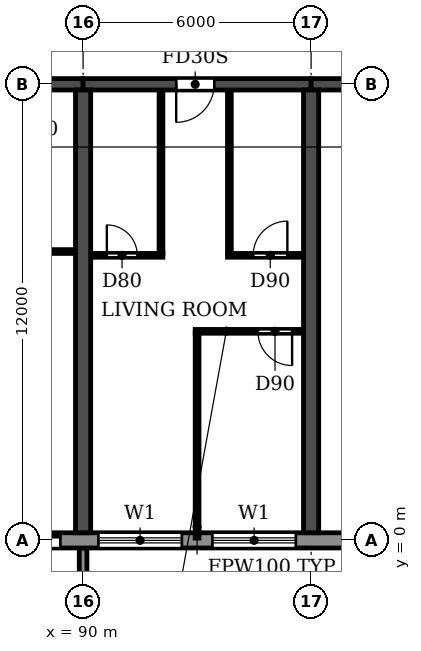
"""IFC4 building model, lengths in metres.
Left out: names, types, materials, properties, quantities, classifications, styles, units other than length and angle.
Written with IfcOpenShell. Run it as: python <this file> out.ifc"""

import sys

from ifc_helpers import new_model, si_unit, direction, frame, frame_2d, origin, place, context, subcontext, project, spatial, polyline, rectangle, outline, extrude, source, transform, mapped, element, fill, save


model = new_model("IFC4")
c1 = context("Model", 3, precision=1e-05, world=origin(), true_north=direction((0.0, 1.0)))
c2 = subcontext(c1, "Body", "Model", "MODEL_VIEW")
j1 = project(units=[si_unit("LENGTHUNIT", "METRE"), si_unit("PLANEANGLEUNIT", "RADIAN")], contexts=[c1])
p1 = place(None, origin())
s1 = spatial("IfcSite", under=j1, at=p1, CompositionType="ELEMENT")
p2 = place(p1, origin())
s2 = spatial("IfcBuilding", under=s1, at=p2, CompositionType="ELEMENT")
p3 = place(p2, frame((0.0, 0.0, 43.2)))
s3 = spatial("IfcBuildingStorey", under=s2, at=p3, CompositionType="ELEMENT", Elevation=43.2)
for number, where, z_axis, x_axis in (
    (1, (90.0, 0.2, 0.0), (0.0, 0.0, 1.0), (0.0, 1.0, 0.0)),
    (2, (96.0, 0.2, 0.0), (0.0, 0.0, 1.0), (0.0, 1.0, 0.0)),
):
    element("IfcWall", number, at=place(p3, frame(where, z_axis=z_axis, x_axis=x_axis)), inside=s3, PredefinedType="SHEAR", context=c2, shape_type="SweptSolid", body=[
        extrude(rectangle(XDim=11.65, YDim=0.4, at=frame_2d((5.825, 0.0))), origin(), (0.0, 0.0, 1.0), 3.05),
    ])
p4 = place(p3, frame((84.0, 12.0, 0.0), z_axis=(0.0, 0.0, 1.0), x_axis=(1.0, 0.0, 0.0)))
e3 = element("IfcWall", 3, at=p4, inside=s3, PredefinedType="SHEAR", context=c2, shape_type="SweptSolid", body=[
    extrude(rectangle(XDim=6.0, YDim=0.3, at=frame_2d((3.0, 0.0))), origin(), (0.0, 0.0, 1.0), 2.45),
])
p5 = place(p4, frame((2.45, 0.0, 0.0)))
e4 = element("IfcOpeningElement", 4, at=p5, cuts=e3, PredefinedType="OPENING", context=c2, shape_type="SweptSolid", body=[
    extrude(rectangle(XDim=1.0, YDim=2.1, at=frame_2d((0.5, 1.05))), frame((0.0, 0.16, 0.0), z_axis=(0.0, -1.0, 0.0), x_axis=(1.0, 0.0, 0.0)), (0.0, 0.0, 1.0), 0.32),
])
p6 = place(p3, frame((90.0, 12.0, 0.0), z_axis=(0.0, 0.0, 1.0), x_axis=(1.0, 0.0, 0.0)))
e5 = element("IfcWall", 5, at=p6, inside=s3, PredefinedType="SHEAR", context=c2, shape_type="SweptSolid", body=[
    extrude(rectangle(XDim=6.0, YDim=0.3, at=frame_2d((3.0, 0.0))), origin(), (0.0, 0.0, 1.0), 2.45),
])
p7 = place(p6, frame((2.45, 0.0, 0.0)))
e6 = element("IfcOpeningElement", 6, at=p7, cuts=e5, PredefinedType="OPENING", context=c2, shape_type="SweptSolid", body=[
    extrude(rectangle(XDim=1.0, YDim=2.1, at=frame_2d((0.5, 1.05))), frame((0.0, 0.16, 0.0), z_axis=(0.0, -1.0, 0.0), x_axis=(1.0, 0.0, 0.0)), (0.0, 0.0, 1.0), 0.32),
])
p8 = place(p3, frame((96.0, 12.0, 0.0), z_axis=(0.0, 0.0, 1.0), x_axis=(1.0, 0.0, 0.0)))
e7 = element("IfcWall", 7, at=p8, inside=s3, PredefinedType="SHEAR", context=c2, shape_type="SweptSolid", body=[
    extrude(rectangle(XDim=5.8, YDim=0.3, at=frame_2d((2.9, 0.0))), origin(), (0.0, 0.0, 1.0), 2.45),
])
p9 = place(p8, frame((2.5, 0.0, 0.0)))
e8 = element("IfcOpeningElement", 8, at=p9, cuts=e7, PredefinedType="OPENING", context=c2, shape_type="SweptSolid", body=[
    extrude(rectangle(XDim=1.0, YDim=2.1, at=frame_2d((0.5, 1.05))), frame((0.0, 0.16, 0.0), z_axis=(0.0, -1.0, 0.0), x_axis=(1.0, 0.0, 0.0)), (0.0, 0.0, 1.0), 0.32),
])
p10 = place(p3, frame((4.683, 0.0, 0.0), z_axis=(0.0, 0.0, 1.0), x_axis=(1.0, 0.0, 0.0)))
e9 = element("IfcWall", 9, at=p10, inside=s3, PredefinedType="STANDARD", context=c2, shape_type="SweptSolid", body=[
    extrude(rectangle(XDim=92.634, YDim=0.4, at=frame_2d((46.317, 0.0))), origin(), (0.0, 0.0, 1.0), 3.05),
])
p11 = place(p10, frame((1.717, 0.0, 0.9)))
e10 = element("IfcOpeningElement", 10, at=p11, cuts=e9, PredefinedType="OPENING", context=c2, shape_type="SweptSolid", body=[
    extrude(rectangle(XDim=2.2, YDim=1.5, at=frame_2d((1.1, 0.75))), frame((0.0, 0.21, 0.0), z_axis=(0.0, -1.0, 0.0), x_axis=(1.0, 0.0, 0.0)), (0.0, 0.0, 1.0), 0.42),
])
p12 = place(p10, frame((4.717, 0.0, 0.9)))
e11 = element("IfcOpeningElement", 11, at=p12, cuts=e9, PredefinedType="OPENING", context=c2, shape_type="SweptSolid", body=[
    extrude(rectangle(XDim=2.2, YDim=1.5, at=frame_2d((1.1, 0.75))), frame((0.0, 0.21, 0.0), z_axis=(0.0, -1.0, 0.0), x_axis=(1.0, 0.0, 0.0)), (0.0, 0.0, 1.0), 0.42),
])
p13 = place(p10, frame((7.717, 0.0, 0.9)))
e12 = element("IfcOpeningElement", 12, at=p13, cuts=e9, PredefinedType="OPENING", context=c2, shape_type="SweptSolid", body=[
    extrude(rectangle(XDim=2.2, YDim=1.5, at=frame_2d((1.1, 0.75))), frame((0.0, 0.21, 0.0), z_axis=(0.0, -1.0, 0.0), x_axis=(1.0, 0.0, 0.0)), (0.0, 0.0, 1.0), 0.42),
])
p14 = place(p10, frame((10.917, 0.0, 0.0)))
e13 = element("IfcOpeningElement", 13, at=p14, cuts=e9, PredefinedType="OPENING", context=c2, shape_type="SweptSolid", body=[
    extrude(rectangle(XDim=1.8, YDim=2.4, at=frame_2d((0.9, 1.2))), frame((0.0, 0.21, 0.0), z_axis=(0.0, -1.0, 0.0), x_axis=(1.0, 0.0, 0.0)), (0.0, 0.0, 1.0), 0.42),
])
p15 = place(p10, frame((13.717, 0.0, 0.9)))
e14 = element("IfcOpeningElement", 14, at=p15, cuts=e9, PredefinedType="OPENING", context=c2, shape_type="SweptSolid", body=[
    extrude(rectangle(XDim=2.2, YDim=1.5, at=frame_2d((1.1, 0.75))), frame((0.0, 0.21, 0.0), z_axis=(0.0, -1.0, 0.0), x_axis=(1.0, 0.0, 0.0)), (0.0, 0.0, 1.0), 0.42),
])
p16 = place(p10, frame((16.717, 0.0, 0.9)))
e15 = element("IfcOpeningElement", 15, at=p16, cuts=e9, PredefinedType="OPENING", context=c2, shape_type="SweptSolid", body=[
    extrude(rectangle(XDim=2.2, YDim=1.5, at=frame_2d((1.1, 0.75))), frame((0.0, 0.21, 0.0), z_axis=(0.0, -1.0, 0.0), x_axis=(1.0, 0.0, 0.0)), (0.0, 0.0, 1.0), 0.42),
])
p17 = place(p10, frame((19.917, 0.0, 0.0)))
e16 = element("IfcOpeningElement", 16, at=p17, cuts=e9, PredefinedType="OPENING", context=c2, shape_type="SweptSolid", body=[
    extrude(rectangle(XDim=1.8, YDim=2.4, at=frame_2d((0.9, 1.2))), frame((0.0, 0.21, 0.0), z_axis=(0.0, -1.0, 0.0), x_axis=(1.0, 0.0, 0.0)), (0.0, 0.0, 1.0), 0.42),
])
p18 = place(p10, frame((22.717, 0.0, 0.9)))
e17 = element("IfcOpeningElement", 17, at=p18, cuts=e9, PredefinedType="OPENING", context=c2, shape_type="SweptSolid", body=[
    extrude(rectangle(XDim=2.2, YDim=1.5, at=frame_2d((1.1, 0.75))), frame((0.0, 0.21, 0.0), z_axis=(0.0, -1.0, 0.0), x_axis=(1.0, 0.0, 0.0)), (0.0, 0.0, 1.0), 0.42),
])
p19 = place(p10, frame((25.717, 0.0, 0.9)))
e18 = element("IfcOpeningElement", 18, at=p19, cuts=e9, PredefinedType="OPENING", context=c2, shape_type="SweptSolid", body=[
    extrude(rectangle(XDim=2.2, YDim=1.5, at=frame_2d((1.1, 0.75))), frame((0.0, 0.21, 0.0), z_axis=(0.0, -1.0, 0.0), x_axis=(1.0, 0.0, 0.0)), (0.0, 0.0, 1.0), 0.42),
])
p20 = place(p10, frame((28.717, 0.0, 0.9)))
e19 = element("IfcOpeningElement", 19, at=p20, cuts=e9, PredefinedType="OPENING", context=c2, shape_type="SweptSolid", body=[
    extrude(rectangle(XDim=2.2, YDim=1.5, at=frame_2d((1.1, 0.75))), frame((0.0, 0.21, 0.0), z_axis=(0.0, -1.0, 0.0), x_axis=(1.0, 0.0, 0.0)), (0.0, 0.0, 1.0), 0.42),
])
p21 = place(p10, frame((31.717, 0.0, 0.9)))
e20 = element("IfcOpeningElement", 20, at=p21, cuts=e9, PredefinedType="OPENING", context=c2, shape_type="SweptSolid", body=[
    extrude(rectangle(XDim=2.2, YDim=1.5, at=frame_2d((1.1, 0.75))), frame((0.0, 0.21, 0.0), z_axis=(0.0, -1.0, 0.0), x_axis=(1.0, 0.0, 0.0)), (0.0, 0.0, 1.0), 0.42),
])
p22 = place(p10, frame((34.917, 0.0, 0.0)))
e21 = element("IfcOpeningElement", 21, at=p22, cuts=e9, PredefinedType="OPENING", context=c2, shape_type="SweptSolid", body=[
    extrude(rectangle(XDim=1.8, YDim=2.4, at=frame_2d((0.9, 1.2))), frame((0.0, 0.21, 0.0), z_axis=(0.0, -1.0, 0.0), x_axis=(1.0, 0.0, 0.0)), (0.0, 0.0, 1.0), 0.42),
])
p23 = place(p10, frame((37.717, 0.0, 0.9)))
e22 = element("IfcOpeningElement", 22, at=p23, cuts=e9, PredefinedType="OPENING", context=c2, shape_type="SweptSolid", body=[
    extrude(rectangle(XDim=2.2, YDim=1.5, at=frame_2d((1.1, 0.75))), frame((0.0, 0.21, 0.0), z_axis=(0.0, -1.0, 0.0), x_axis=(1.0, 0.0, 0.0)), (0.0, 0.0, 1.0), 0.42),
])
p24 = place(p10, frame((40.717, 0.0, 0.9)))
e23 = element("IfcOpeningElement", 23, at=p24, cuts=e9, PredefinedType="OPENING", context=c2, shape_type="SweptSolid", body=[
    extrude(rectangle(XDim=2.2, YDim=1.5, at=frame_2d((1.1, 0.75))), frame((0.0, 0.21, 0.0), z_axis=(0.0, -1.0, 0.0), x_axis=(1.0, 0.0, 0.0)), (0.0, 0.0, 1.0), 0.42),
])
p25 = place(p10, frame((43.717, 0.0, 0.9)))
e24 = element("IfcOpeningElement", 24, at=p25, cuts=e9, PredefinedType="OPENING", context=c2, shape_type="SweptSolid", body=[
    extrude(rectangle(XDim=2.2, YDim=1.5, at=frame_2d((1.1, 0.75))), frame((0.0, 0.21, 0.0), z_axis=(0.0, -1.0, 0.0), x_axis=(1.0, 0.0, 0.0)), (0.0, 0.0, 1.0), 0.42),
])
p26 = place(p10, frame((46.917, 0.0, 0.0)))
e25 = element("IfcOpeningElement", 25, at=p26, cuts=e9, PredefinedType="OPENING", context=c2, shape_type="SweptSolid", body=[
    extrude(rectangle(XDim=1.8, YDim=2.4, at=frame_2d((0.9, 1.2))), frame((0.0, 0.21, 0.0), z_axis=(0.0, -1.0, 0.0), x_axis=(1.0, 0.0, 0.0)), (0.0, 0.0, 1.0), 0.42),
])
p27 = place(p10, frame((49.717, 0.0, 0.9)))
e26 = element("IfcOpeningElement", 26, at=p27, cuts=e9, PredefinedType="OPENING", context=c2, shape_type="SweptSolid", body=[
    extrude(rectangle(XDim=2.2, YDim=1.5, at=frame_2d((1.1, 0.75))), frame((0.0, 0.21, 0.0), z_axis=(0.0, -1.0, 0.0), x_axis=(1.0, 0.0, 0.0)), (0.0, 0.0, 1.0), 0.42),
])
p28 = place(p10, frame((52.717, 0.0, 0.9)))
e27 = element("IfcOpeningElement", 27, at=p28, cuts=e9, PredefinedType="OPENING", context=c2, shape_type="SweptSolid", body=[
    extrude(rectangle(XDim=2.2, YDim=1.5, at=frame_2d((1.1, 0.75))), frame((0.0, 0.21, 0.0), z_axis=(0.0, -1.0, 0.0), x_axis=(1.0, 0.0, 0.0)), (0.0, 0.0, 1.0), 0.42),
])
p29 = place(p10, frame((55.717, 0.0, 0.9)))
e28 = element("IfcOpeningElement", 28, at=p29, cuts=e9, PredefinedType="OPENING", context=c2, shape_type="SweptSolid", body=[
    extrude(rectangle(XDim=2.2, YDim=1.5, at=frame_2d((1.1, 0.75))), frame((0.0, 0.21, 0.0), z_axis=(0.0, -1.0, 0.0), x_axis=(1.0, 0.0, 0.0)), (0.0, 0.0, 1.0), 0.42),
])
p30 = place(p10, frame((58.917, 0.0, 0.0)))
e29 = element("IfcOpeningElement", 29, at=p30, cuts=e9, PredefinedType="OPENING", context=c2, shape_type="SweptSolid", body=[
    extrude(rectangle(XDim=1.8, YDim=2.4, at=frame_2d((0.9, 1.2))), frame((0.0, 0.21, 0.0), z_axis=(0.0, -1.0, 0.0), x_axis=(1.0, 0.0, 0.0)), (0.0, 0.0, 1.0), 0.42),
])
p31 = place(p10, frame((61.717, 0.0, 0.9)))
e30 = element("IfcOpeningElement", 30, at=p31, cuts=e9, PredefinedType="OPENING", context=c2, shape_type="SweptSolid", body=[
    extrude(rectangle(XDim=2.2, YDim=1.5, at=frame_2d((1.1, 0.75))), frame((0.0, 0.21, 0.0), z_axis=(0.0, -1.0, 0.0), x_axis=(1.0, 0.0, 0.0)), (0.0, 0.0, 1.0), 0.42),
])
p32 = place(p10, frame((64.717, 0.0, 0.9)))
e31 = element("IfcOpeningElement", 31, at=p32, cuts=e9, PredefinedType="OPENING", context=c2, shape_type="SweptSolid", body=[
    extrude(rectangle(XDim=2.2, YDim=1.5, at=frame_2d((1.1, 0.75))), frame((0.0, 0.21, 0.0), z_axis=(0.0, -1.0, 0.0), x_axis=(1.0, 0.0, 0.0)), (0.0, 0.0, 1.0), 0.42),
])
p33 = place(p10, frame((67.717, 0.0, 0.9)))
e32 = element("IfcOpeningElement", 32, at=p33, cuts=e9, PredefinedType="OPENING", context=c2, shape_type="SweptSolid", body=[
    extrude(rectangle(XDim=2.2, YDim=1.5, at=frame_2d((1.1, 0.75))), frame((0.0, 0.21, 0.0), z_axis=(0.0, -1.0, 0.0), x_axis=(1.0, 0.0, 0.0)), (0.0, 0.0, 1.0), 0.42),
])
p34 = place(p10, frame((70.917, 0.0, 0.0)))
e33 = element("IfcOpeningElement", 33, at=p34, cuts=e9, PredefinedType="OPENING", context=c2, shape_type="SweptSolid", body=[
    extrude(rectangle(XDim=1.8, YDim=2.4, at=frame_2d((0.9, 1.2))), frame((0.0, 0.21, 0.0), z_axis=(0.0, -1.0, 0.0), x_axis=(1.0, 0.0, 0.0)), (0.0, 0.0, 1.0), 0.42),
])
p35 = place(p10, frame((73.717, 0.0, 0.9)))
e34 = element("IfcOpeningElement", 34, at=p35, cuts=e9, PredefinedType="OPENING", context=c2, shape_type="SweptSolid", body=[
    extrude(rectangle(XDim=2.2, YDim=1.5, at=frame_2d((1.1, 0.75))), frame((0.0, 0.21, 0.0), z_axis=(0.0, -1.0, 0.0), x_axis=(1.0, 0.0, 0.0)), (0.0, 0.0, 1.0), 0.42),
])
p36 = place(p10, frame((76.717, 0.0, 0.9)))
e35 = element("IfcOpeningElement", 35, at=p36, cuts=e9, PredefinedType="OPENING", context=c2, shape_type="SweptSolid", body=[
    extrude(rectangle(XDim=2.2, YDim=1.5, at=frame_2d((1.1, 0.75))), frame((0.0, 0.21, 0.0), z_axis=(0.0, -1.0, 0.0), x_axis=(1.0, 0.0, 0.0)), (0.0, 0.0, 1.0), 0.42),
])
p37 = place(p10, frame((79.717, 0.0, 0.9)))
e36 = element("IfcOpeningElement", 36, at=p37, cuts=e9, PredefinedType="OPENING", context=c2, shape_type="SweptSolid", body=[
    extrude(rectangle(XDim=2.2, YDim=1.5, at=frame_2d((1.1, 0.75))), frame((0.0, 0.21, 0.0), z_axis=(0.0, -1.0, 0.0), x_axis=(1.0, 0.0, 0.0)), (0.0, 0.0, 1.0), 0.42),
])
p38 = place(p10, frame((82.917, 0.0, 0.0)))
e37 = element("IfcOpeningElement", 37, at=p38, cuts=e9, PredefinedType="OPENING", context=c2, shape_type="SweptSolid", body=[
    extrude(rectangle(XDim=1.8, YDim=2.4, at=frame_2d((0.9, 1.2))), frame((0.0, 0.21, 0.0), z_axis=(0.0, -1.0, 0.0), x_axis=(1.0, 0.0, 0.0)), (0.0, 0.0, 1.0), 0.42),
])
p39 = place(p10, frame((85.717, 0.0, 0.9)))
e38 = element("IfcOpeningElement", 38, at=p39, cuts=e9, PredefinedType="OPENING", context=c2, shape_type="SweptSolid", body=[
    extrude(rectangle(XDim=2.2, YDim=1.5, at=frame_2d((1.1, 0.75))), frame((0.0, 0.21, 0.0), z_axis=(0.0, -1.0, 0.0), x_axis=(1.0, 0.0, 0.0)), (0.0, 0.0, 1.0), 0.42),
])
p40 = place(p10, frame((88.717, 0.0, 0.9)))
e39 = element("IfcOpeningElement", 39, at=p40, cuts=e9, PredefinedType="OPENING", context=c2, shape_type="SweptSolid", body=[
    extrude(rectangle(XDim=2.2, YDim=1.5, at=frame_2d((1.1, 0.75))), frame((0.0, 0.21, 0.0), z_axis=(0.0, -1.0, 0.0), x_axis=(1.0, 0.0, 0.0)), (0.0, 0.0, 1.0), 0.42),
])
m1 = source(origin(), c2, "Body", "SweptSolid", [
    extrude(outline(polyline([(0.0, 0.0), (0.2, 0.0), (0.2, 1.65), (0.0, 1.65), (0.0, 0.0)])), origin(), (0.0, 0.0, 1.0), 3.1),
])
p41 = place(p3, frame((89.9, -1.85, 0.0)))
e40 = element("IfcWall", 40, at=p41, inside=s3, PredefinedType="STANDARD", context=c2, shape_type="MappedRepresentation", body=[
    mapped(m1, transform((0.0, 0.0, 0.0))),
])
p42 = place(p3, frame((92.95, 5.5, 0.0), z_axis=(0.0, 0.0, 1.0), x_axis=(1.0, 0.0, 0.0)))
e41 = element("IfcWall", 41, at=p42, inside=s3, PredefinedType="PARTITIONING", context=c2, shape_type="SweptSolid", body=[
    extrude(rectangle(XDim=2.84, YDim=0.1, at=frame_2d((1.42, 0.0))), origin(), (0.0, 0.0, 1.0), 3.05),
])
p43 = place(p42, frame((1.65, 0.0, 0.0)))
e42 = element("IfcOpeningElement", 42, at=p43, cuts=e41, PredefinedType="OPENING", context=c2, shape_type="SweptSolid", body=[
    extrude(rectangle(XDim=0.9, YDim=2.1, at=frame_2d((0.45, 1.05))), frame((0.0, 0.06, 0.0), z_axis=(0.0, -1.0, 0.0), x_axis=(1.0, 0.0, 0.0)), (0.0, 0.0, 1.0), 0.12),
])
p44 = place(p3, frame((90.21, 7.5, 0.0), z_axis=(0.0, 0.0, 1.0), x_axis=(1.0, 0.0, 0.0)))
e43 = element("IfcWall", 43, at=p44, inside=s3, PredefinedType="PARTITIONING", context=c2, shape_type="SweptSolid", body=[
    extrude(rectangle(XDim=1.89, YDim=0.1, at=frame_2d((0.945, 0.0))), origin(), (0.0, 0.0, 1.0), 3.05),
])
p45 = place(p44, frame((0.415, 0.0, 0.0)))
e44 = element("IfcOpeningElement", 44, at=p45, cuts=e43, PredefinedType="OPENING", context=c2, shape_type="SweptSolid", body=[
    extrude(rectangle(XDim=0.8, YDim=2.1, at=frame_2d((0.4, 1.05))), frame((0.0, 0.06, 0.0), z_axis=(0.0, -1.0, 0.0), x_axis=(1.0, 0.0, 0.0)), (0.0, 0.0, 1.0), 0.12),
])
p46 = place(p3, frame((93.8, 7.5, 0.0), z_axis=(0.0, 0.0, 1.0), x_axis=(1.0, 0.0, 0.0)))
e45 = element("IfcWall", 45, at=p46, inside=s3, PredefinedType="PARTITIONING", context=c2, shape_type="SweptSolid", body=[
    extrude(rectangle(XDim=1.99, YDim=0.1, at=frame_2d((0.995, 0.0))), origin(), (0.0, 0.0, 1.0), 3.05),
])
p47 = place(p46, frame((0.675, 0.0, 0.0)))
e46 = element("IfcOpeningElement", 46, at=p47, cuts=e45, PredefinedType="OPENING", context=c2, shape_type="SweptSolid", body=[
    extrude(rectangle(XDim=0.9, YDim=2.1, at=frame_2d((0.45, 1.05))), frame((0.0, 0.06, 0.0), z_axis=(0.0, -1.0, 0.0), x_axis=(1.0, 0.0, 0.0)), (0.0, 0.0, 1.0), 0.12),
])
p48 = place(p3, frame((87.8, 7.6, 0.0), z_axis=(0.0, 0.0, 1.0), x_axis=(1.0, 0.0, 0.0)))
e47 = element("IfcWall", 47, at=p48, inside=s3, PredefinedType="PARTITIONING", context=c2, shape_type="SweptSolid", body=[
    extrude(rectangle(XDim=1.99, YDim=0.1, at=frame_2d((0.995, 0.0))), origin(), (0.0, 0.0, 1.0), 3.05),
])
p49 = place(p3, frame((92.05, 7.55, 0.0), z_axis=(0.0, 0.0, 1.0), x_axis=(0.0, 1.0, 0.0)))
e48 = element("IfcWall", 48, at=p49, inside=s3, PredefinedType="PARTITIONING", context=c2, shape_type="SweptSolid", body=[
    extrude(rectangle(XDim=4.29, YDim=0.1, at=frame_2d((2.145, 0.0))), origin(), (0.0, 0.0, 1.0), 3.05),
])
p50 = place(p3, frame((93.0, 0.06, 0.0), z_axis=(0.0, 0.0, 1.0), x_axis=(0.0, 1.0, 0.0)))
e49 = element("IfcWall", 49, at=p50, inside=s3, PredefinedType="PARTITIONING", context=c2, shape_type="SweptSolid", body=[
    extrude(rectangle(XDim=5.39, YDim=0.1, at=frame_2d((2.695, 0.0))), origin(), (0.0, 0.0, 1.0), 3.05),
])
p51 = place(p3, frame((93.85, 7.55, 0.0), z_axis=(0.0, 0.0, 1.0), x_axis=(0.0, 1.0, 0.0)))
e50 = element("IfcWall", 50, at=p51, inside=s3, PredefinedType="PARTITIONING", context=c2, shape_type="SweptSolid", body=[
    extrude(rectangle(XDim=4.29, YDim=0.1, at=frame_2d((2.145, 0.0))), origin(), (0.0, 0.0, 1.0), 3.05),
])
p52 = place(p38, origin())
e51 = element("IfcDoor", 51, at=p52, inside=s3, OperationType="DOUBLE_DOOR_SLIDING", PredefinedType="DOOR", context=c2, shape_type="SweptSolid", body=[
    extrude(rectangle(XDim=1.8, YDim=2.4, at=frame_2d((0.9, 1.2))), frame((0.0, 0.025, 0.0), z_axis=(0.0, -1.0, 0.0), x_axis=(1.0, 0.0, 0.0)), (0.0, 0.0, 1.0), 0.05),
])
fill(e37, e51)
p53 = place(p39, origin())
e52 = element("IfcWindow", 52, at=p53, inside=s3, PartitioningType="DOUBLE_PANEL_HORIZONTAL", PredefinedType="WINDOW", context=c2, shape_type="SweptSolid", body=[
    extrude(rectangle(XDim=2.2, YDim=1.5, at=frame_2d((1.1, 0.75))), frame((0.0, 0.03, 0.0), z_axis=(0.0, -1.0, 0.0), x_axis=(1.0, 0.0, 0.0)), (0.0, 0.0, 1.0), 0.06),
])
fill(e38, e52)
p54 = place(p40, origin())
e53 = element("IfcWindow", 53, at=p54, inside=s3, PartitioningType="DOUBLE_PANEL_HORIZONTAL", PredefinedType="WINDOW", context=c2, shape_type="SweptSolid", body=[
    extrude(rectangle(XDim=2.2, YDim=1.5, at=frame_2d((1.1, 0.75))), frame((0.0, 0.03, 0.0), z_axis=(0.0, -1.0, 0.0), x_axis=(1.0, 0.0, 0.0)), (0.0, 0.0, 1.0), 0.06),
])
fill(e39, e53)
p55 = place(p45, origin())
e54 = element("IfcDoor", 54, at=p55, inside=s3, OperationType="SINGLE_SWING_LEFT", PredefinedType="DOOR", context=c2, shape_type="SweptSolid", body=[
    extrude(rectangle(XDim=0.8, YDim=2.1, at=frame_2d((0.4, 1.05))), frame((0.0, 0.025, 0.0), z_axis=(0.0, -1.0, 0.0), x_axis=(1.0, 0.0, 0.0)), (0.0, 0.0, 1.0), 0.05),
])
fill(e44, e54)
p56 = place(p7, frame((1.0, 0.0, 0.0), z_axis=(0.0, 0.0, 1.0), x_axis=(-1.0, 0.0, 0.0)))
e55 = element("IfcDoor", 55, at=p56, inside=s3, OperationType="SINGLE_SWING_RIGHT", PredefinedType="DOOR", context=c2, shape_type="SweptSolid", body=[
    extrude(rectangle(XDim=1.0, YDim=2.1, at=frame_2d((0.5, 1.05))), frame((0.0, 0.025, 0.0), z_axis=(0.0, -1.0, 0.0), x_axis=(1.0, 0.0, 0.0)), (0.0, 0.0, 1.0), 0.05),
])
fill(e6, e55)
p57 = place(p47, origin())
e56 = element("IfcDoor", 56, at=p57, inside=s3, OperationType="SINGLE_SWING_RIGHT", PredefinedType="DOOR", context=c2, shape_type="SweptSolid", body=[
    extrude(rectangle(XDim=0.9, YDim=2.1, at=frame_2d((0.45, 1.05))), frame((0.0, 0.025, 0.0), z_axis=(0.0, -1.0, 0.0), x_axis=(1.0, 0.0, 0.0)), (0.0, 0.0, 1.0), 0.05),
])
fill(e46, e56)
p58 = place(p43, frame((0.9, 0.0, 0.0), z_axis=(0.0, 0.0, 1.0), x_axis=(-1.0, 0.0, 0.0)))
e57 = element("IfcDoor", 57, at=p58, inside=s3, OperationType="SINGLE_SWING_LEFT", PredefinedType="DOOR", context=c2, shape_type="SweptSolid", body=[
    extrude(rectangle(XDim=0.9, YDim=2.1, at=frame_2d((0.45, 1.05))), frame((0.0, 0.025, 0.0), z_axis=(0.0, -1.0, 0.0), x_axis=(1.0, 0.0, 0.0)), (0.0, 0.0, 1.0), 0.05),
])
fill(e42, e57)
save(model, sys.argv[1])
